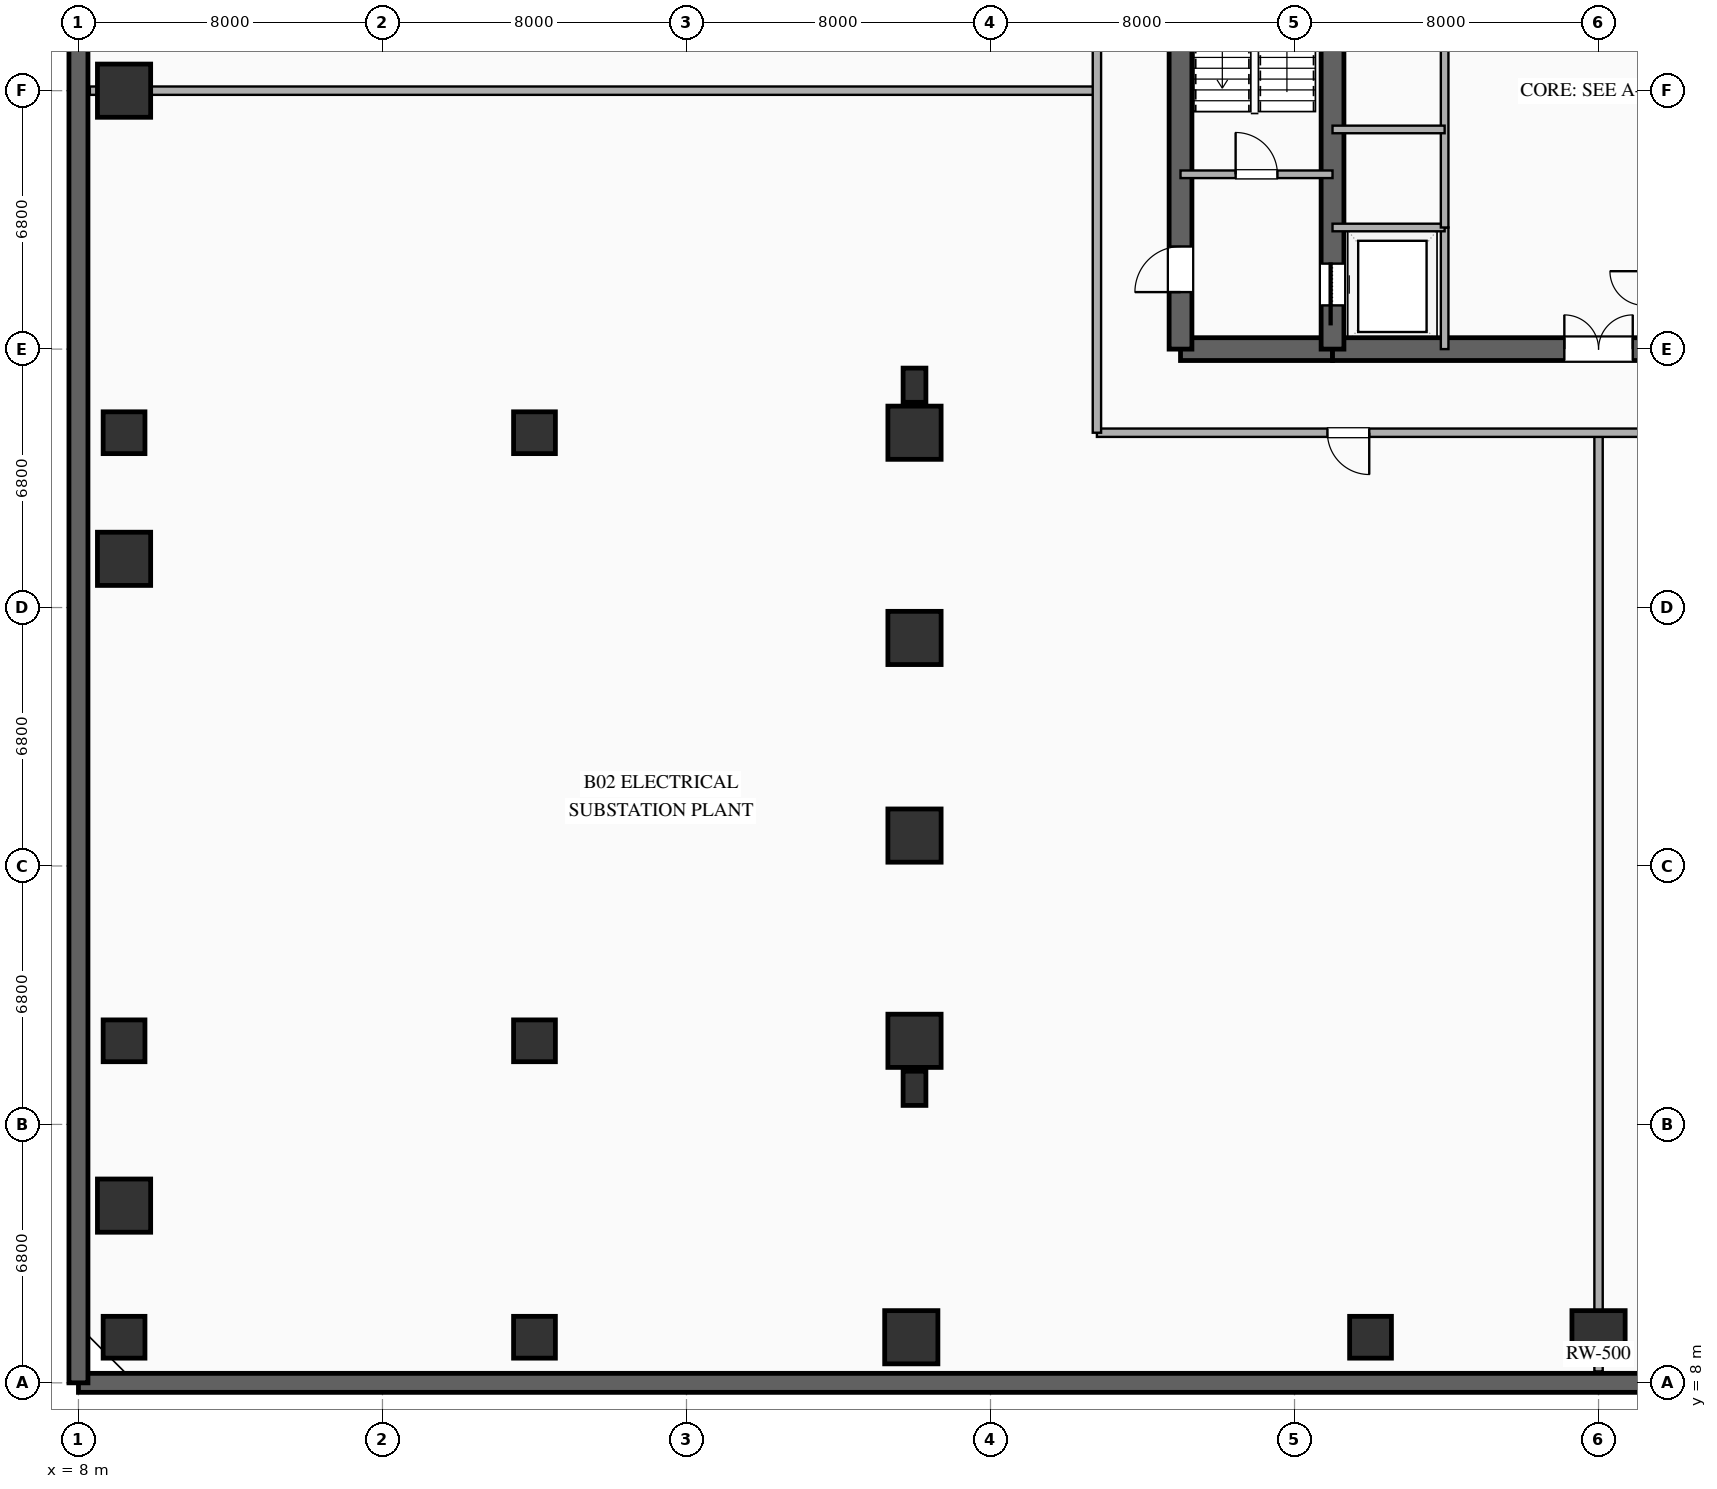
"""IFC4 building model, lengths in metres.
Left out: names, types, materials, properties, quantities, classifications, styles, units other than length and angle.
Written with IfcOpenShell. Run it as: python <this file> out.ifc"""

import sys

from ifc_helpers import new_model, si_unit, direction, frame, frame_2d, origin, origin_2d, place, context, subcontext, project, spatial, rectangle, extrude, element, fill, save


model = new_model("IFC4")
c1 = context("Model", 3, precision=1e-05, world=origin(), true_north=direction((0.0, 1.0)))
c2 = subcontext(c1, "Body", "Model", "MODEL_VIEW")
j1 = project(units=[si_unit("LENGTHUNIT", "METRE"), si_unit("PLANEANGLEUNIT", "RADIAN")], contexts=[c1])
p1 = place(None, origin())
s1 = spatial("IfcSite", under=j1, at=p1, CompositionType="ELEMENT")
p2 = place(p1, origin())
s2 = spatial("IfcBuilding", under=s1, at=p2, CompositionType="ELEMENT")
p3 = place(p2, frame((0.0, 0.0, -9.0)))
s3 = spatial("IfcBuildingStorey", under=s2, at=p3, CompositionType="ELEMENT", Elevation=-9.0)
p4 = place(p3, frame((8.0, 8.0, 0.0), z_axis=(0.0, 0.0, 1.0), x_axis=(1.0, 0.0, 0.0)))
e1 = element("IfcWall", 1, at=p4, inside=s3, PredefinedType="SOLIDWALL", context=c2, shape_type="SweptSolid", body=[
    extrude(rectangle(XDim=80.0, YDim=0.5, at=frame_2d((40.0, 0.0))), origin(), (0.0, 0.0, 1.0), 4.18),
])
p5 = place(p3, frame((8.0, 76.0, 0.0), z_axis=(0.0, 0.0, 1.0), x_axis=(0.0, -1.0, 0.0)))
e2 = element("IfcWall", 2, at=p5, inside=s3, PredefinedType="SOLIDWALL", context=c2, shape_type="SweptSolid", body=[
    extrude(rectangle(XDim=68.0, YDim=0.5, at=frame_2d((34.0, 0.0))), origin(), (0.0, 0.0, 1.0), 4.18),
])
p6 = place(p3, frame((37.0, 35.2, 0.0), z_axis=(0.0, 0.0, 1.0), x_axis=(1.0, 0.0, 0.0)))
e3 = element("IfcWall", 3, at=p6, inside=s3, PredefinedType="SHEAR", context=c2, shape_type="SweptSolid", body=[
    extrude(rectangle(XDim=4.0, YDim=0.6, at=frame_2d((2.0, 0.0))), origin(), (0.0, 0.0, 1.0), 4.18),
])
p7 = place(p3, frame((41.0, 35.2, 0.0), z_axis=(0.0, 0.0, 1.0), x_axis=(1.0, 0.0, 0.0)))
e4 = element("IfcWall", 4, at=p7, inside=s3, PredefinedType="SHEAR", context=c2, shape_type="SweptSolid", body=[
    extrude(rectangle(XDim=14.0, YDim=0.6, at=frame_2d((7.0, 0.0))), origin(), (0.0, 0.0, 1.0), 4.18),
])
p8 = place(p7, frame((6.1, 0.0, 0.0)))
e5 = element("IfcOpeningElement", 5, at=p8, cuts=e4, PredefinedType="OPENING", context=c2, shape_type="SweptSolid", body=[
    extrude(rectangle(XDim=1.8, YDim=2.25, at=frame_2d((0.9, 1.125))), frame((0.0, 0.31, 0.0), z_axis=(0.0, -1.0, 0.0), x_axis=(1.0, 0.0, 0.0)), (0.0, 0.0, 1.0), 0.62),
])
p9 = place(p3, frame((37.0, 35.2, 0.0), z_axis=(0.0, 0.0, 1.0), x_axis=(0.0, 1.0, 0.0)))
e6 = element("IfcWall", 6, at=p9, inside=s3, PredefinedType="SHEAR", context=c2, shape_type="SweptSolid", body=[
    extrude(rectangle(XDim=13.6, YDim=0.6, at=frame_2d((6.8, 0.0))), origin(), (0.0, 0.0, 1.0), 4.18),
])
p10 = place(p9, frame((1.5, 0.0, 0.0)))
e7 = element("IfcOpeningElement", 7, at=p10, cuts=e6, PredefinedType="OPENING", context=c2, shape_type="SweptSolid", body=[
    extrude(rectangle(XDim=1.2, YDim=2.15, at=frame_2d((0.6, 1.075))), frame((0.0, 0.31, 0.0), z_axis=(0.0, -1.0, 0.0), x_axis=(1.0, 0.0, 0.0)), (0.0, 0.0, 1.0), 0.62),
])
p11 = place(p3, frame((41.0, 35.2, 0.0), z_axis=(0.0, 0.0, 1.0), x_axis=(0.0, 1.0, 0.0)))
e8 = element("IfcWall", 8, at=p11, inside=s3, PredefinedType="SHEAR", context=c2, shape_type="SweptSolid", body=[
    extrude(rectangle(XDim=13.6, YDim=0.6, at=frame_2d((6.8, 0.0))), origin(), (0.0, 0.0, 1.0), 4.18),
])
p12 = place(p11, frame((1.15, 0.0, 0.0)))
e9 = element("IfcOpeningElement", 9, at=p12, cuts=e8, PredefinedType="OPENING", context=c2, shape_type="SweptSolid", body=[
    extrude(rectangle(XDim=1.1, YDim=2.2, at=frame_2d((0.55, 1.1))), frame((0.0, 0.31, 0.0), z_axis=(0.0, -1.0, 0.0), x_axis=(1.0, 0.0, 0.0)), (0.0, 0.0, 1.0), 0.62),
])
for number, where, z_axis, x_axis in (
    (10, (9.2, 9.2, 0.0), (0.0, 0.0, 1.0), (1.0, 0.0, 0.0)),
    (11, (20.0, 9.2, 0.0), (0.0, 0.0, 1.0), (1.0, 0.0, 0.0)),
    (12, (42.0, 9.2, 0.0), (0.0, 0.0, 1.0), (1.0, 0.0, 0.0)),
    (13, (9.2, 17.0, 0.0), (0.0, 0.0, 1.0), (1.0, 0.0, 0.0)),
    (14, (9.2, 33.0, 0.0), (0.0, 0.0, 1.0), (1.0, 0.0, 0.0)),
    (15, (20.0, 17.0, 0.0), (0.0, 0.0, 1.0), (1.0, 0.0, 0.0)),
):
    element("IfcColumn", number, at=place(p3, frame(where, z_axis=z_axis, x_axis=x_axis)), inside=s3, PredefinedType="COLUMN", context=c2, shape_type="SweptSolid", body=[
        extrude(rectangle(XDim=1.1, YDim=1.1, at=origin_2d()), origin(), (0.0, 0.0, 1.0), 4.18),
    ])
p13 = place(p3, frame((30.0, 17.0, 0.0), z_axis=(0.0, 0.0, 1.0), x_axis=(1.0, 0.0, 0.0)))
e16 = element("IfcColumn", 16, at=p13, inside=s3, PredefinedType="COLUMN", context=c2, shape_type="SweptSolid", body=[
    extrude(rectangle(XDim=1.4, YDim=1.4, at=origin_2d()), origin(), (0.0, 0.0, 1.0), 4.18),
])
p14 = place(p3, frame((20.0, 33.0, 0.0), z_axis=(0.0, 0.0, 1.0), x_axis=(1.0, 0.0, 0.0)))
e17 = element("IfcColumn", 17, at=p14, inside=s3, PredefinedType="COLUMN", context=c2, shape_type="SweptSolid", body=[
    extrude(rectangle(XDim=1.1, YDim=1.1, at=origin_2d()), origin(), (0.0, 0.0, 1.0), 4.18),
])
for number, where, z_axis, x_axis in (
    (18, (30.0, 33.0, 0.0), (0.0, 0.0, 1.0), (1.0, 0.0, 0.0)),
    (19, (9.2, 42.0, 0.0), (0.0, 0.0, 1.0), (1.0, 0.0, 0.0)),
    (20, (9.2, 29.682, 0.0), (0.0, 0.0, 1.0), (1.0, 0.0, 0.0)),
    (21, (9.2, 12.663, 0.0), (0.0, 0.0, 1.0), (1.0, 0.0, 0.0)),
    (22, (29.916, 9.2, 0.0), (0.0, 0.0, 1.0), (1.0, 0.0, 0.0)),
    (23, (48.0, 9.2, 0.0), (0.0, 0.0, 1.0), (1.0, 0.0, 0.0)),
    (24, (30.0, 22.4, 0.0), (0.0, 0.0, 1.0), (1.0, 0.0, 0.0)),
    (25, (30.0, 27.6, 0.0), (0.0, 0.0, 1.0), (1.0, 0.0, 0.0)),
):
    element("IfcColumn", number, at=place(p3, frame(where, z_axis=z_axis, x_axis=x_axis)), inside=s3, PredefinedType="COLUMN", context=c2, shape_type="SweptSolid", body=[
        extrude(rectangle(XDim=1.4, YDim=1.4, at=origin_2d()), origin(), (0.0, 0.0, 1.0), 4.18),
    ])
for number, where, z_axis, x_axis in (
    (26, (30.0, 15.75, 0.0), (0.0, 0.0, 1.0), (1.0, 0.0, 0.0)),
    (27, (30.0, 34.25, 0.0), (0.0, 0.0, 1.0), (1.0, 0.0, 0.0)),
):
    element("IfcColumn", number, at=place(p3, frame(where, z_axis=z_axis, x_axis=x_axis)), inside=s3, PredefinedType="PILASTER", context=c2, shape_type="SweptSolid", body=[
        extrude(rectangle(XDim=0.6, YDim=0.9, at=origin_2d()), origin(), (0.0, 0.0, 1.0), 4.18),
    ])
p15 = place(p3, frame((37.0, 39.8, 0.0), z_axis=(0.0, 0.0, 1.0), x_axis=(1.0, 0.0, 0.0)))
e28 = element("IfcWall", 28, at=p15, inside=s3, PredefinedType="SOLIDWALL", context=c2, shape_type="SweptSolid", body=[
    extrude(rectangle(XDim=4.0, YDim=0.2, at=frame_2d((2.0, 0.0))), origin(), (0.0, 0.0, 1.0), 3.38),
])
p16 = place(p15, frame((1.45, 0.0, 0.0)))
e29 = element("IfcOpeningElement", 29, at=p16, cuts=e28, PredefinedType="OPENING", context=c2, shape_type="SweptSolid", body=[
    extrude(rectangle(XDim=1.1, YDim=2.15, at=frame_2d((0.55, 1.075))), frame((0.0, 0.11, 0.0), z_axis=(0.0, -1.0, 0.0), x_axis=(1.0, 0.0, 0.0)), (0.0, 0.0, 1.0), 0.22),
])
p17 = place(p3, frame((43.95, 35.2, 0.0), z_axis=(0.0, 0.0, 1.0), x_axis=(0.0, 1.0, 0.0)))
e30 = element("IfcWall", 30, at=p17, inside=s3, PredefinedType="SOLIDWALL", context=c2, shape_type="SweptSolid", body=[
    extrude(rectangle(XDim=3.2, YDim=0.2, at=frame_2d((1.6, 0.0))), origin(), (0.0, 0.0, 1.0), 3.38),
])
p18 = place(p3, frame((41.0, 38.4, 0.0), z_axis=(0.0, 0.0, 1.0), x_axis=(1.0, 0.0, 0.0)))
e31 = element("IfcWall", 31, at=p18, inside=s3, PredefinedType="SOLIDWALL", context=c2, shape_type="SweptSolid", body=[
    extrude(rectangle(XDim=2.95, YDim=0.2, at=frame_2d((1.475, 0.0))), origin(), (0.0, 0.0, 1.0), 3.38),
])
p19 = place(p3, frame((43.95, 38.4, 0.0), z_axis=(0.0, 0.0, 1.0), x_axis=(0.0, 1.0, 0.0)))
e32 = element("IfcWall", 32, at=p19, inside=s3, PredefinedType="SOLIDWALL", context=c2, shape_type="SweptSolid", body=[
    extrude(rectangle(XDim=7.8, YDim=0.2, at=frame_2d((3.9, 0.0))), origin(), (0.0, 0.0, 1.0), 3.38),
])
p20 = place(p3, frame((41.0, 40.98, 0.0), z_axis=(0.0, 0.0, 1.0), x_axis=(1.0, 0.0, 0.0)))
e33 = element("IfcWall", 33, at=p20, inside=s3, PredefinedType="SOLIDWALL", context=c2, shape_type="SweptSolid", body=[
    extrude(rectangle(XDim=2.95, YDim=0.2, at=frame_2d((1.475, 0.0))), origin(), (0.0, 0.0, 1.0), 3.38),
])
p21 = place(p3, frame((34.8, 42.0, 0.0), z_axis=(0.0, 0.0, 1.0), x_axis=(-1.0, 0.0, 0.0)))
e34 = element("IfcWall", 34, at=p21, inside=s3, PredefinedType="SOLIDWALL", context=c2, shape_type="SweptSolid", body=[
    extrude(rectangle(XDim=26.5, YDim=0.22, at=frame_2d((13.25, 0.0))), origin(), (0.0, 0.0, 1.0), 3.38),
])
p22 = place(p3, frame((48.0, 33.0, 0.0), z_axis=(0.0, 0.0, 1.0), x_axis=(0.0, -1.0, 0.0)))
e35 = element("IfcWall", 35, at=p22, inside=s3, PredefinedType="SOLIDWALL", context=c2, shape_type="SweptSolid", body=[
    extrude(rectangle(XDim=24.7, YDim=0.22, at=frame_2d((12.35, 0.0))), origin(), (0.0, 0.0, 1.0), 3.38),
])
p23 = place(p3, frame((61.2, 33.0, 0.0), z_axis=(0.0, 0.0, 1.0), x_axis=(-1.0, 0.0, 0.0)))
e36 = element("IfcWall", 36, at=p23, inside=s3, PredefinedType="SOLIDWALL", context=c2, shape_type="SweptSolid", body=[
    extrude(rectangle(XDim=26.4, YDim=0.22, at=frame_2d((13.2, 0.0))), origin(), (0.0, 0.0, 1.0), 3.38),
])
p24 = place(p23, frame((19.234, 0.0, 0.0)))
e37 = element("IfcOpeningElement", 37, at=p24, cuts=e36, PredefinedType="OPENING", context=c2, shape_type="SweptSolid", body=[
    extrude(rectangle(XDim=1.1, YDim=2.15, at=frame_2d((0.55, 1.075))), frame((0.0, 0.12, 0.0), z_axis=(0.0, -1.0, 0.0), x_axis=(1.0, 0.0, 0.0)), (0.0, 0.0, 1.0), 0.24),
])
p25 = place(p23, frame((6.066, 0.0, 0.0)))
e38 = element("IfcOpeningElement", 38, at=p25, cuts=e36, PredefinedType="OPENING", context=c2, shape_type="SweptSolid", body=[
    extrude(rectangle(XDim=1.1, YDim=2.15, at=frame_2d((0.55, 1.075))), frame((0.0, 0.12, 0.0), z_axis=(0.0, -1.0, 0.0), x_axis=(1.0, 0.0, 0.0)), (0.0, 0.0, 1.0), 0.24),
])
p26 = place(p3, frame((34.8, 33.0, 0.0), z_axis=(0.0, 0.0, 1.0), x_axis=(0.0, 1.0, 0.0)))
e39 = element("IfcWall", 39, at=p26, inside=s3, PredefinedType="SOLIDWALL", context=c2, shape_type="SweptSolid", body=[
    extrude(rectangle(XDim=18.0, YDim=0.22, at=frame_2d((9.0, 0.0))), origin(), (0.0, 0.0, 1.0), 3.38),
])
p27 = place(p12, origin())
e40 = element("IfcDoor", 40, at=p27, inside=s3, OperationType="SLIDING_TO_LEFT", PredefinedType="DOOR", context=c2, shape_type="SweptSolid", body=[
    extrude(rectangle(XDim=1.1, YDim=2.2, at=frame_2d((0.55, 1.1))), frame((0.0, 0.025, 0.0), z_axis=(0.0, -1.0, 0.0), x_axis=(1.0, 0.0, 0.0)), (0.0, 0.0, 1.0), 0.05),
])
fill(e9, e40)
p28 = place(p10, origin())
e41 = element("IfcDoor", 41, at=p28, inside=s3, OperationType="SINGLE_SWING_LEFT", PredefinedType="DOOR", context=c2, shape_type="SweptSolid", body=[
    extrude(rectangle(XDim=1.2, YDim=2.15, at=frame_2d((0.6, 1.075))), frame((0.0, 0.025, 0.0), z_axis=(0.0, -1.0, 0.0), x_axis=(1.0, 0.0, 0.0)), (0.0, 0.0, 1.0), 0.05),
])
fill(e7, e41)
p29 = place(p8, origin())
e42 = element("IfcDoor", 42, at=p29, inside=s3, OperationType="DOUBLE_DOOR_SINGLE_SWING", PredefinedType="DOOR", context=c2, shape_type="SweptSolid", body=[
    extrude(rectangle(XDim=1.8, YDim=2.25, at=frame_2d((0.9, 1.125))), frame((0.0, 0.025, 0.0), z_axis=(0.0, -1.0, 0.0), x_axis=(1.0, 0.0, 0.0)), (0.0, 0.0, 1.0), 0.05),
])
fill(e5, e42)
p30 = place(p16, origin())
e43 = element("IfcDoor", 43, at=p30, inside=s3, OperationType="SINGLE_SWING_LEFT", PredefinedType="DOOR", context=c2, shape_type="SweptSolid", body=[
    extrude(rectangle(XDim=1.1, YDim=2.15, at=frame_2d((0.55, 1.075))), frame((0.0, 0.025, 0.0), z_axis=(0.0, -1.0, 0.0), x_axis=(1.0, 0.0, 0.0)), (0.0, 0.0, 1.0), 0.05),
])
fill(e29, e43)
p31 = place(p24, origin())
e44 = element("IfcDoor", 44, at=p31, inside=s3, OperationType="SINGLE_SWING_LEFT", PredefinedType="DOOR", context=c2, shape_type="SweptSolid", body=[
    extrude(rectangle(XDim=1.1, YDim=2.15, at=frame_2d((0.55, 1.075))), frame((0.0, 0.025, 0.0), z_axis=(0.0, -1.0, 0.0), x_axis=(1.0, 0.0, 0.0)), (0.0, 0.0, 1.0), 0.05),
])
fill(e37, e44)
save(model, sys.argv[1])
